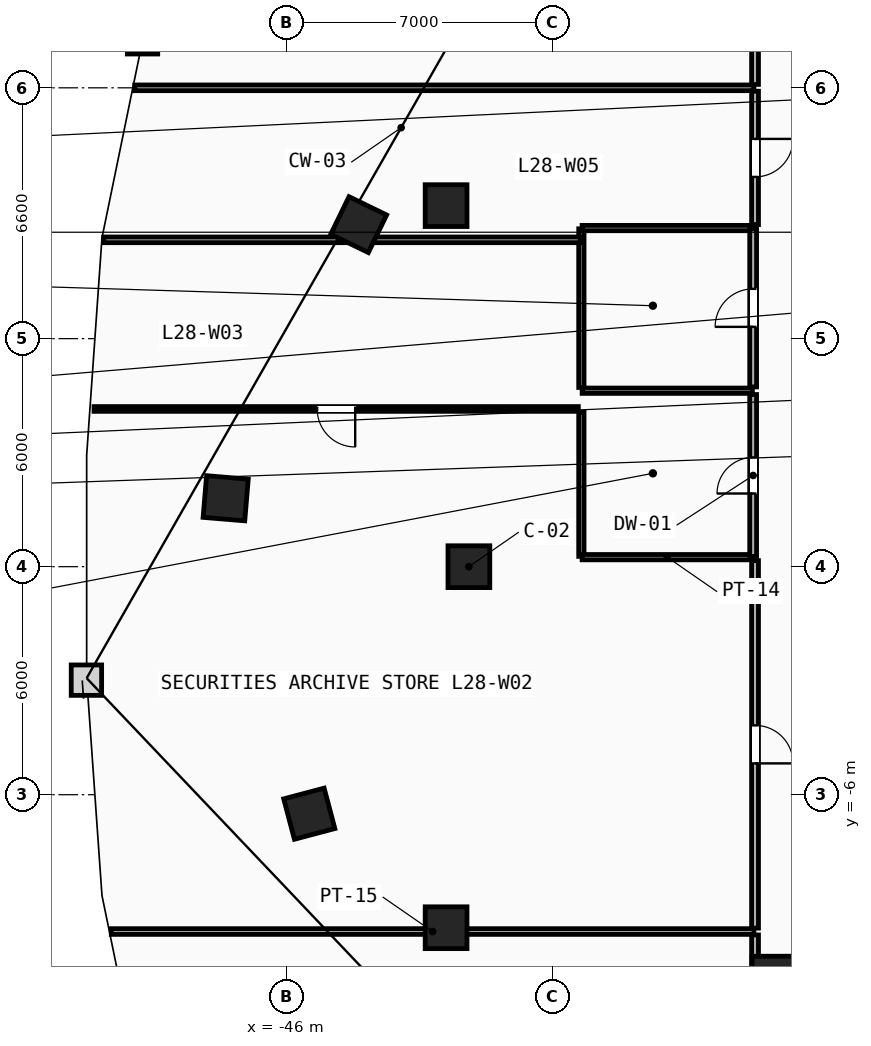
"""IFC4 building model, lengths in metres.
Left out: names, types, materials, properties, quantities, classifications, styles, units other than length and angle.
Written with IfcOpenShell. Run it as: python <this file> out.ifc"""

import sys

from ifc_helpers import new_model, si_unit, direction, frame, frame_2d, origin, origin_2d, place, context, subcontext, project, spatial, rectangle, extrude, element, fill, save


model = new_model("IFC4")
c1 = context("Model", 3, precision=1e-05, world=origin(), true_north=direction((0.0, 1.0)))
c2 = subcontext(c1, "Body", "Model", "MODEL_VIEW")
j1 = project(units=[si_unit("LENGTHUNIT", "METRE"), si_unit("PLANEANGLEUNIT", "RADIAN")], contexts=[c1])
p1 = place(None, origin())
s1 = spatial("IfcSite", under=j1, at=p1, CompositionType="ELEMENT")
p2 = place(p1, origin())
s2 = spatial("IfcBuilding", under=s1, at=p2, CompositionType="ELEMENT")
p3 = place(p2, frame((0.0, 0.0, 110.6)))
s3 = spatial("IfcBuildingStorey", under=s2, at=p3, CompositionType="ELEMENT", Elevation=110.6)
for number, where, z_axis, x_axis in (
    (1, (-41.2, 0.0, 0.0), (0.0, 0.0, 1.0), (1.0, 0.0, 0.0)),
    (2, (-41.8, 9.5, 0.0), (0.0, 0.0, 1.0), (1.0, 0.0, 0.0)),
    (3, (-41.8, -9.5, 0.0), (0.0, 0.0, 1.0), (1.0, 0.0, 0.0)),
    (4, (-33.2, -10.8, 0.0), (0.0, 0.0, 1.0), (1.0, 0.0, 0.0)),
    (5, (-44.1, 9.0, 0.0), (0.0, 0.0, 1.0), (-0.437, -0.899, 0.0)),
    (6, (-47.6, 1.8, 0.0), (0.0, 0.0, 1.0), (-0.084, -0.997, 0.0)),
    (7, (-45.4, -6.5, 0.0), (0.0, 0.0, 1.0), (0.256, -0.967, 0.0)),
):
    element("IfcColumn", number, at=place(p3, frame(where, z_axis=z_axis, x_axis=x_axis)), inside=s3, PredefinedType="COLUMN", context=c2, shape_type="SweptSolid", body=[
        extrude(rectangle(XDim=1.1, YDim=1.1, at=origin_2d()), origin(), (0.0, 0.0, 1.0), 3.6),
    ])
p4 = place(p3, frame((-38.24, 0.27, 0.0), z_axis=(0.0, 0.0, 1.0), x_axis=(0.0, 1.0, 0.0)))
e8 = element("IfcWall", 8, at=p4, inside=s3, PredefinedType="PARTITIONING", context=c2, shape_type="SweptSolid", body=[
    extrude(rectangle(XDim=3.795, YDim=0.14, at=frame_2d((1.897, 0.0))), origin(), (0.0, 0.0, 1.0), 3.3),
])
p5 = place(p3, frame((-38.24, 4.715, 0.0), z_axis=(0.0, 0.0, 1.0), x_axis=(0.0, 1.0, 0.0)))
e9 = element("IfcWall", 9, at=p5, inside=s3, PredefinedType="PARTITIONING", context=c2, shape_type="SweptSolid", body=[
    extrude(rectangle(XDim=4.175, YDim=0.14, at=frame_2d((2.087, 0.0))), origin(), (0.0, 0.0, 1.0), 3.3),
])
for number, where, z_axis, x_axis in (
    (10, (-38.22, 0.25, 0.0), (0.0, 0.0, 1.0), (1.0, 0.0, 0.0)),
    (11, (-38.22, 4.63, 0.0), (0.0, 0.0, 1.0), (1.0, 0.0, 0.0)),
    (12, (-38.22, 8.91, 0.0), (0.0, 0.0, 1.0), (1.0, 0.0, 0.0)),
):
    element("IfcWall", number, at=place(p3, frame(where, z_axis=z_axis, x_axis=x_axis)), inside=s3, PredefinedType="PARTITIONING", context=c2, shape_type="SweptSolid", body=[
        extrude(rectangle(XDim=4.48, YDim=0.14, at=frame_2d((2.24, 0.0))), origin(), (0.0, 0.0, 1.0), 3.3),
    ])
p6 = place(p3, frame((-33.72, 0.27, 0.0), z_axis=(0.0, 0.0, 1.0), x_axis=(0.0, 1.0, 0.0)))
e13 = element("IfcWall", 13, at=p6, inside=s3, PredefinedType="PARTITIONING", context=c2, shape_type="SweptSolid", body=[
    extrude(rectangle(XDim=4.26, YDim=0.18, at=frame_2d((2.13, 0.0))), origin(), (0.0, 0.0, 1.0), 3.3),
])
p7 = place(p6, frame((1.655, 0.0, 0.0)))
e14 = element("IfcOpeningElement", 14, at=p7, cuts=e13, PredefinedType="OPENING", context=c2, shape_type="SweptSolid", body=[
    extrude(rectangle(XDim=0.95, YDim=2.1, at=frame_2d((0.475, 1.05))), frame((0.0, 0.1, 0.0), z_axis=(0.0, -1.0, 0.0), x_axis=(1.0, 0.0, 0.0)), (0.0, 0.0, 1.0), 0.2),
])
p8 = place(p3, frame((-33.72, 4.73, 0.0), z_axis=(0.0, 0.0, 1.0), x_axis=(0.0, 1.0, 0.0)))
e15 = element("IfcWall", 15, at=p8, inside=s3, PredefinedType="PARTITIONING", context=c2, shape_type="SweptSolid", body=[
    extrude(rectangle(XDim=4.16, YDim=0.18, at=frame_2d((2.08, 0.0))), origin(), (0.0, 0.0, 1.0), 3.3),
])
p9 = place(p8, frame((1.58, 0.0, 0.0)))
e16 = element("IfcOpeningElement", 16, at=p9, cuts=e15, PredefinedType="OPENING", context=c2, shape_type="SweptSolid", body=[
    extrude(rectangle(XDim=1.0, YDim=2.15, at=frame_2d((0.5, 1.075))), frame((0.0, 0.1, 0.0), z_axis=(0.0, -1.0, 0.0), x_axis=(1.0, 0.0, 0.0)), (0.0, 0.0, 1.0), 0.2),
])
p10 = place(p3, frame((-50.61, -9.6, 0.0), z_axis=(0.0, 0.0, 1.0), x_axis=(1.0, 0.0, 0.0)))
e17 = element("IfcWall", 17, at=p10, inside=s3, PredefinedType="PARTITIONING", context=c2, shape_type="SweptSolid", body=[
    extrude(rectangle(XDim=16.91, YDim=0.15, at=frame_2d((8.455, 0.0))), origin(), (0.0, 0.0, 1.0), 2.605),
])
p11 = place(p3, frame((-50.809, 8.6, 0.0), z_axis=(0.0, 0.0, 1.0), x_axis=(1.0, 0.0, 0.0)))
e18 = element("IfcWall", 18, at=p11, inside=s3, PredefinedType="PARTITIONING", context=c2, shape_type="SweptSolid", body=[
    extrude(rectangle(XDim=12.539, YDim=0.15, at=frame_2d((6.269, 0.0))), origin(), (0.0, 0.0, 1.0), 3.3),
])
p12 = place(p3, frame((-49.993, 12.6, 0.0), z_axis=(0.0, 0.0, 1.0), x_axis=(1.0, 0.0, 0.0)))
e19 = element("IfcWall", 19, at=p12, inside=s3, PredefinedType="PARTITIONING", context=c2, shape_type="SweptSolid", body=[
    extrude(rectangle(XDim=16.293, YDim=0.15, at=frame_2d((8.146, 0.0))), origin(), (0.0, 0.0, 1.0), 3.3),
])
p13 = place(p3, frame((-33.67, -9.69, 0.0), z_axis=(0.0, 0.0, 1.0), x_axis=(0.0, -1.0, 0.0)))
e20 = element("IfcWall", 20, at=p13, inside=s3, PredefinedType="PARTITIONING", context=c2, shape_type="SweptSolid", body=[
    extrude(rectangle(XDim=1.71, YDim=0.18, at=frame_2d((0.855, 0.0))), origin(), (0.0, 0.0, 1.0), 3.3),
])
p14 = place(p3, frame((-33.67, 0.159, 0.0), z_axis=(0.0, 0.0, 1.0), x_axis=(0.0, -1.0, 0.0)))
e21 = element("IfcWall", 21, at=p14, inside=s3, PredefinedType="PARTITIONING", context=c2, shape_type="SweptSolid", body=[
    extrude(rectangle(XDim=9.669, YDim=0.18, at=frame_2d((4.834, 0.0))), origin(), (0.0, 0.0, 1.0), 3.3),
])
p15 = place(p14, frame((4.334, 0.0, 0.0)))
e22 = element("IfcOpeningElement", 22, at=p15, cuts=e21, PredefinedType="OPENING", context=c2, shape_type="SweptSolid", body=[
    extrude(rectangle(XDim=1.0, YDim=2.15, at=frame_2d((0.5, 1.075))), frame((0.0, 0.1, 0.0), z_axis=(0.0, -1.0, 0.0), x_axis=(1.0, 0.0, 0.0)), (0.0, 0.0, 1.0), 0.2),
])
p16 = place(p3, frame((-33.67, 17.428, 0.0), z_axis=(0.0, 0.0, 1.0), x_axis=(0.0, -1.0, 0.0)))
e23 = element("IfcWall", 23, at=p16, inside=s3, PredefinedType="PARTITIONING", context=c2, shape_type="SweptSolid", body=[
    extrude(rectangle(XDim=4.739, YDim=0.18, at=frame_2d((2.369, 0.0))), origin(), (0.0, 0.0, 1.0), 3.3),
])
p17 = place(p3, frame((-33.67, 12.51, 0.0), z_axis=(0.0, 0.0, 1.0), x_axis=(0.0, -1.0, 0.0)))
e24 = element("IfcWall", 24, at=p17, inside=s3, PredefinedType="PARTITIONING", context=c2, shape_type="SweptSolid", body=[
    extrude(rectangle(XDim=3.509, YDim=0.18, at=frame_2d((1.754, 0.0))), origin(), (0.0, 0.0, 1.0), 3.3),
])
p18 = place(p17, frame((1.254, 0.0, 0.0)))
e25 = element("IfcOpeningElement", 25, at=p18, cuts=e24, PredefinedType="OPENING", context=c2, shape_type="SweptSolid", body=[
    extrude(rectangle(XDim=1.0, YDim=2.15, at=frame_2d((0.5, 1.075))), frame((0.0, 0.1, 0.0), z_axis=(0.0, -1.0, 0.0), x_axis=(1.0, 0.0, 0.0)), (0.0, 0.0, 1.0), 0.2),
])
p19 = place(p3, frame((-38.32, 4.15, 0.0), z_axis=(0.0, 0.0, 1.0), x_axis=(-1.0, 0.0, 0.0)))
e26 = element("IfcWall", 26, at=p19, inside=s3, PredefinedType="PARTITIONING", context=c2, shape_type="SweptSolid", body=[
    extrude(rectangle(XDim=12.744, YDim=0.125, at=frame_2d((6.372, 0.0))), origin(), (0.0, 0.0, 1.0), 3.3),
])
p20 = place(p19, frame((5.872, 0.0, 0.0)))
e27 = element("IfcOpeningElement", 27, at=p20, cuts=e26, PredefinedType="OPENING", context=c2, shape_type="SweptSolid", body=[
    extrude(rectangle(XDim=1.0, YDim=2.15, at=frame_2d((0.5, 1.075))), frame((0.0, 0.073, 0.0), z_axis=(0.0, -1.0, 0.0), x_axis=(1.0, 0.0, 0.0)), (0.0, 0.0, 1.0), 0.145),
])
p21 = place(p20, origin())
e28 = element("IfcDoor", 28, at=p21, inside=s3, OperationType="SINGLE_SWING_LEFT", PredefinedType="DOOR", context=c2, shape_type="SweptSolid", body=[
    extrude(rectangle(XDim=1.0, YDim=2.15, at=frame_2d((0.5, 1.075))), frame((0.0, 0.025, 0.0), z_axis=(0.0, -1.0, 0.0), x_axis=(1.0, 0.0, 0.0)), (0.0, 0.0, 1.0), 0.05),
])
fill(e27, e28)
p22 = place(p15, origin())
e29 = element("IfcDoor", 29, at=p22, inside=s3, OperationType="SINGLE_SWING_RIGHT", PredefinedType="DOOR", context=c2, shape_type="SweptSolid", body=[
    extrude(rectangle(XDim=1.0, YDim=2.15, at=frame_2d((0.5, 1.075))), frame((0.0, 0.025, 0.0), z_axis=(0.0, -1.0, 0.0), x_axis=(1.0, 0.0, 0.0)), (0.0, 0.0, 1.0), 0.05),
])
fill(e22, e29)
p23 = place(p7, origin())
e30 = element("IfcDoor", 30, at=p23, inside=s3, OperationType="SINGLE_SWING_LEFT", PredefinedType="DOOR", context=c2, shape_type="SweptSolid", body=[
    extrude(rectangle(XDim=0.95, YDim=2.1, at=frame_2d((0.475, 1.05))), frame((0.0, 0.025, 0.0), z_axis=(0.0, -1.0, 0.0), x_axis=(1.0, 0.0, 0.0)), (0.0, 0.0, 1.0), 0.05),
])
fill(e14, e30)
p24 = place(p9, origin())
e31 = element("IfcDoor", 31, at=p24, inside=s3, OperationType="SINGLE_SWING_LEFT", PredefinedType="DOOR", context=c2, shape_type="SweptSolid", body=[
    extrude(rectangle(XDim=1.0, YDim=2.15, at=frame_2d((0.5, 1.075))), frame((0.0, 0.025, 0.0), z_axis=(0.0, -1.0, 0.0), x_axis=(1.0, 0.0, 0.0)), (0.0, 0.0, 1.0), 0.05),
])
fill(e16, e31)
p25 = place(p18, origin())
e32 = element("IfcDoor", 32, at=p25, inside=s3, OperationType="SINGLE_SWING_LEFT", PredefinedType="DOOR", context=c2, shape_type="SweptSolid", body=[
    extrude(rectangle(XDim=1.0, YDim=2.15, at=frame_2d((0.5, 1.075))), frame((0.0, 0.025, 0.0), z_axis=(0.0, -1.0, 0.0), x_axis=(1.0, 0.0, 0.0)), (0.0, 0.0, 1.0), 0.05),
])
fill(e25, e32)
save(model, sys.argv[1])
